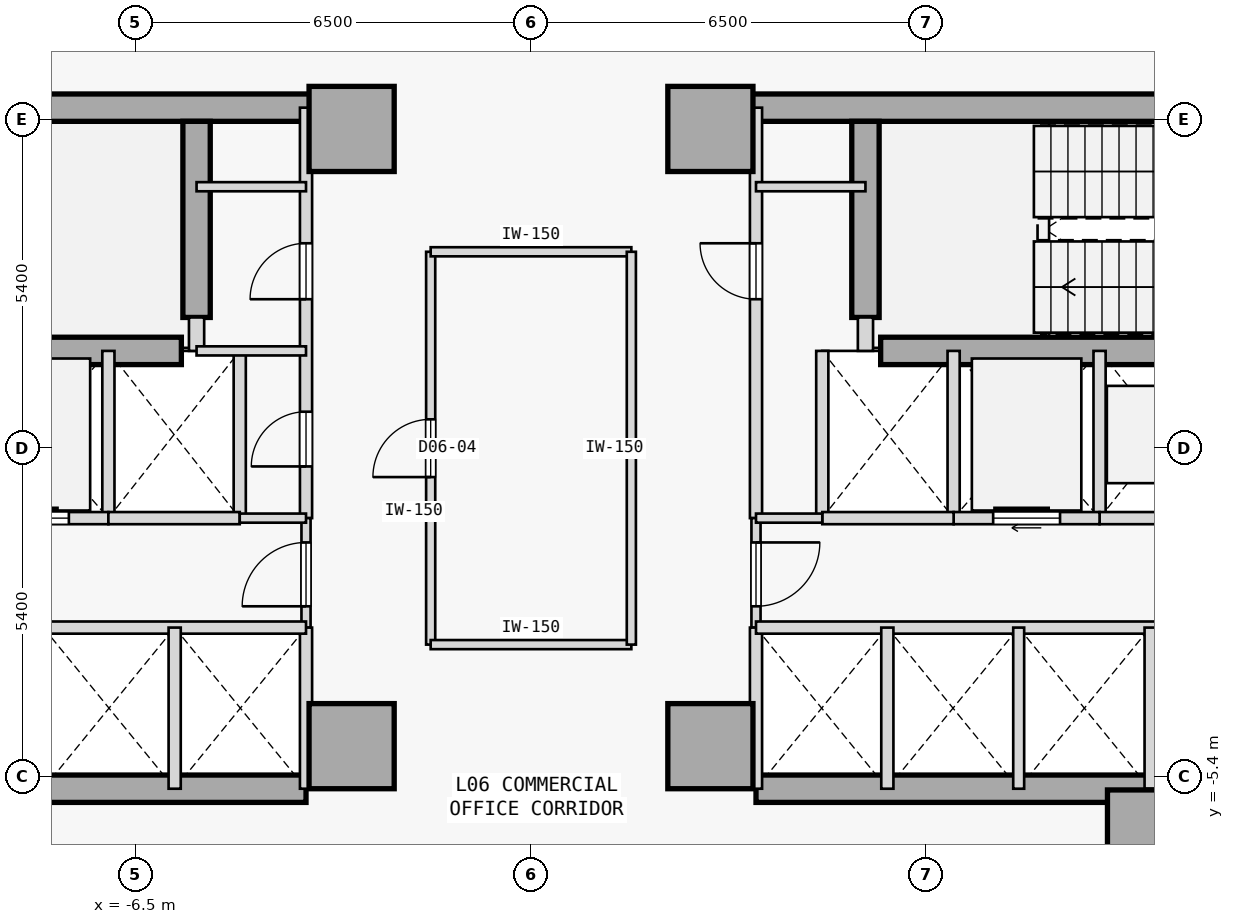
"""IFC4 building model, lengths in metres.
Left out: names, types, materials, properties, quantities, classifications, styles, units other than length and angle.
Written with IfcOpenShell. Run it as: python <this file> out.ifc"""

import sys

from ifc_helpers import new_model, si_unit, direction, frame, frame_2d, origin, origin_2d, place, context, subcontext, project, spatial, rectangle, extrude, element, fill, save


model = new_model("IFC4")
c1 = context("Model", 3, precision=1e-05, world=origin(), true_north=direction((0.0, 1.0)))
c2 = subcontext(c1, "Body", "Model", "MODEL_VIEW")
j1 = project(units=[si_unit("LENGTHUNIT", "METRE"), si_unit("PLANEANGLEUNIT", "RADIAN")], contexts=[c1])
p1 = place(None, origin())
s1 = spatial("IfcSite", under=j1, at=p1, CompositionType="ELEMENT")
p2 = place(p1, origin())
s2 = spatial("IfcBuilding", under=s1, at=p2, CompositionType="ELEMENT")
p3 = place(p2, frame((0.0, 0.0, 29.4)))
s3 = spatial("IfcBuildingStorey", under=s2, at=p3, CompositionType="ELEMENT", Elevation=29.4)
for number, where, z_axis, x_axis in (
    (1, (-2.95, -4.9, 0.0), (0.0, 0.0, 1.0), (1.0, 0.0, 0.0)),
    (2, (-2.95, 5.25, 0.0), (0.0, 0.0, 1.0), (1.0, 0.0, 0.0)),
    (3, (10.18, -6.32, 0.0), (0.0, 0.0, 1.0), (1.0, 0.0, 0.0)),
    (4, (2.95, -4.9, 0.0), (0.0, 0.0, 1.0), (1.0, 0.0, 0.0)),
    (5, (2.95, 5.25, 0.0), (0.0, 0.0, 1.0), (1.0, 0.0, 0.0)),
):
    element("IfcColumn", number, at=place(p3, frame(where, z_axis=z_axis, x_axis=x_axis)), inside=s3, PredefinedType="COLUMN", context=c2, shape_type="SweptSolid", body=[
        extrude(rectangle(XDim=1.4, YDim=1.4, at=origin_2d()), origin(), (0.0, 0.0, 1.0), 3.8),
    ])
p4 = place(p3, frame((-14.56, 5.6, 0.0), z_axis=(0.0, 0.0, 1.0), x_axis=(1.0, 0.0, 0.0)))
e6 = element("IfcWall", 6, at=p4, inside=s3, PredefinedType="SHEAR", context=c2, shape_type="SweptSolid", body=[
    extrude(rectangle(XDim=11.41, YDim=0.45, at=frame_2d((5.705, 0.0))), origin(), (0.0, 0.0, 1.0), 3.575),
])
p5 = place(p3, frame((-14.56, -5.6, 0.0), z_axis=(0.0, 0.0, 1.0), x_axis=(1.0, 0.0, 0.0)))
e7 = element("IfcWall", 7, at=p5, inside=s3, PredefinedType="SHEAR", context=c2, shape_type="SweptSolid", body=[
    extrude(rectangle(XDim=10.86, YDim=0.45, at=frame_2d((5.43, 0.0))), origin(), (0.0, 0.0, 1.0), 3.575),
])
p6 = place(p3, frame((-5.5, 2.15, 0.0), z_axis=(0.0, 0.0, 1.0), x_axis=(0.0, 1.0, 0.0)))
e8 = element("IfcWall", 8, at=p6, inside=s3, PredefinedType="SHEAR", context=c2, shape_type="SweptSolid", body=[
    extrude(rectangle(XDim=3.225, YDim=0.45, at=frame_2d((1.613, 0.0))), origin(), (0.0, 0.0, 1.0), 3.575),
])
p7 = place(p3, frame((-10.9, 1.6, 0.0), z_axis=(0.0, 0.0, 1.0), x_axis=(1.0, 0.0, 0.0)))
e9 = element("IfcWall", 9, at=p7, inside=s3, PredefinedType="SHEAR", context=c2, shape_type="SweptSolid", body=[
    extrude(rectangle(XDim=5.15, YDim=0.45, at=frame_2d((2.575, 0.0))), origin(), (0.0, 0.0, 1.0), 3.575),
])
p8 = place(p3, frame((3.15, 5.6, 0.0), z_axis=(0.0, 0.0, 1.0), x_axis=(1.0, 0.0, 0.0)))
e10 = element("IfcWall", 10, at=p8, inside=s3, PredefinedType="SHEAR", context=c2, shape_type="SweptSolid", body=[
    extrude(rectangle(XDim=11.41, YDim=0.45, at=frame_2d((5.705, 0.0))), origin(), (0.0, 0.0, 1.0), 3.575),
])
p9 = place(p3, frame((3.7, -5.6, 0.0), z_axis=(0.0, 0.0, 1.0), x_axis=(1.0, 0.0, 0.0)))
e11 = element("IfcWall", 11, at=p9, inside=s3, PredefinedType="SHEAR", context=c2, shape_type="SweptSolid", body=[
    extrude(rectangle(XDim=10.86, YDim=0.45, at=frame_2d((5.43, 0.0))), origin(), (0.0, 0.0, 1.0), 3.575),
])
p10 = place(p3, frame((5.5, 2.15, 0.0), z_axis=(0.0, 0.0, 1.0), x_axis=(0.0, 1.0, 0.0)))
e12 = element("IfcWall", 12, at=p10, inside=s3, PredefinedType="SHEAR", context=c2, shape_type="SweptSolid", body=[
    extrude(rectangle(XDim=3.225, YDim=0.45, at=frame_2d((1.613, 0.0))), origin(), (0.0, 0.0, 1.0), 3.575),
])
p11 = place(p3, frame((5.75, 1.6, 0.0), z_axis=(0.0, 0.0, 1.0), x_axis=(1.0, 0.0, 0.0)))
e13 = element("IfcWall", 13, at=p11, inside=s3, PredefinedType="SHEAR", context=c2, shape_type="SweptSolid", body=[
    extrude(rectangle(XDim=5.15, YDim=0.45, at=frame_2d((2.575, 0.0))), origin(), (0.0, 0.0, 1.0), 3.575),
])
p12 = place(p3, frame((-5.5, 1.6, 0.0), z_axis=(0.0, 0.0, 1.0), x_axis=(0.0, 1.0, 0.0)))
e14 = element("IfcWall", 14, at=p12, inside=s3, PredefinedType="STANDARD", context=c2, shape_type="SweptSolid", body=[
    extrude(rectangle(XDim=0.55, YDim=0.25, at=frame_2d((0.275, 0.0))), origin(), (0.0, 0.0, 1.0), 3.575),
])
p13 = place(p3, frame((-3.7, -1.15, 0.0), z_axis=(0.0, 0.0, 1.0), x_axis=(0.0, 1.0, 0.0)))
e15 = element("IfcWall", 15, at=p13, inside=s3, PredefinedType="STANDARD", context=c2, shape_type="SweptSolid", body=[
    extrude(rectangle(XDim=6.75, YDim=0.2, at=frame_2d((3.375, 0.0))), origin(), (0.0, 0.0, 1.0), 3.575),
])
p14 = place(p13, frame((3.6, 0.0, 0.0)))
e16 = element("IfcOpeningElement", 16, at=p14, cuts=e15, PredefinedType="OPENING", context=c2, shape_type="SweptSolid", body=[
    extrude(rectangle(XDim=0.92, YDim=2.15, at=frame_2d((0.46, 1.075))), frame((0.0, 0.11, 0.0), z_axis=(0.0, -1.0, 0.0), x_axis=(1.0, 0.0, 0.0)), (0.0, 0.0, 1.0), 0.22),
])
p15 = place(p13, frame((0.85, 0.0, 0.0)))
e17 = element("IfcOpeningElement", 17, at=p15, cuts=e15, PredefinedType="OPENING", context=c2, shape_type="SweptSolid", body=[
    extrude(rectangle(XDim=0.9, YDim=2.15, at=frame_2d((0.45, 1.075))), frame((0.0, 0.11, 0.0), z_axis=(0.0, -1.0, 0.0), x_axis=(1.0, 0.0, 0.0)), (0.0, 0.0, 1.0), 0.22),
])
p16 = place(p3, frame((-3.7, -2.95, 0.0), z_axis=(0.0, 0.0, 1.0), x_axis=(0.0, 1.0, 0.0)))
e18 = element("IfcWall", 18, at=p16, inside=s3, PredefinedType="PARTITIONING", context=c2, shape_type="SweptSolid", body=[
    extrude(rectangle(XDim=1.8, YDim=0.15, at=frame_2d((0.9, 0.0))), origin(), (0.0, 0.0, 1.0), 3.575),
])
p17 = place(p16, frame((0.35, 0.0, 0.0)))
e19 = element("IfcOpeningElement", 19, at=p17, cuts=e18, PredefinedType="OPENING", context=c2, shape_type="SweptSolid", body=[
    extrude(rectangle(XDim=1.05, YDim=2.18, at=frame_2d((0.525, 1.09))), frame((0.0, 0.085, 0.0), z_axis=(0.0, -1.0, 0.0), x_axis=(1.0, 0.0, 0.0)), (0.0, 0.0, 1.0), 0.17),
])
p18 = place(p3, frame((-3.7, -5.6, 0.0), z_axis=(0.0, 0.0, 1.0), x_axis=(0.0, 1.0, 0.0)))
e20 = element("IfcWall", 20, at=p18, inside=s3, PredefinedType="STANDARD", context=c2, shape_type="SweptSolid", body=[
    extrude(rectangle(XDim=2.65, YDim=0.2, at=frame_2d((1.325, 0.0))), origin(), (0.0, 0.0, 1.0), 3.575),
])
p19 = place(p3, frame((-6.95, -1.15, 0.0), z_axis=(0.0, 0.0, 1.0), x_axis=(0.0, 1.0, 0.0)))
e21 = element("IfcWall", 21, at=p19, inside=s3, PredefinedType="STANDARD", context=c2, shape_type="SweptSolid", body=[
    extrude(rectangle(XDim=2.75, YDim=0.2, at=frame_2d((1.375, 0.0))), origin(), (0.0, 0.0, 1.0), 3.575),
])
p20 = place(p3, frame((-9.35, -1.15, 0.0), z_axis=(0.0, 0.0, 1.0), x_axis=(1.0, 0.0, 0.0)))
e22 = element("IfcWall", 22, at=p20, inside=s3, PredefinedType="STANDARD", context=c2, shape_type="SweptSolid", body=[
    extrude(rectangle(XDim=2.4, YDim=0.2, at=frame_2d((1.2, 0.0))), origin(), (0.0, 0.0, 1.0), 3.575),
])
p21 = place(p20, frame((0.65, 0.0, 0.0)))
e23 = element("IfcOpeningElement", 23, at=p21, cuts=e22, PredefinedType="OPENING", context=c2, shape_type="SweptSolid", body=[
    extrude(rectangle(XDim=1.1, YDim=2.15, at=frame_2d((0.55, 1.075))), frame((0.0, 0.11, 0.0), z_axis=(0.0, -1.0, 0.0), x_axis=(1.0, 0.0, 0.0)), (0.0, 0.0, 1.0), 0.22),
])
p22 = place(p3, frame((-4.79, -1.15, 0.0), z_axis=(0.0, 0.0, 1.0), x_axis=(0.0, 1.0, 0.0)))
e24 = element("IfcWall", 24, at=p22, inside=s3, PredefinedType="STANDARD", context=c2, shape_type="SweptSolid", body=[
    extrude(rectangle(XDim=2.75, YDim=0.2, at=frame_2d((1.375, 0.0))), origin(), (0.0, 0.0, 1.0), 3.575),
])
p23 = place(p3, frame((-6.95, -1.15, 0.0), z_axis=(0.0, 0.0, 1.0), x_axis=(1.0, 0.0, 0.0)))
e25 = element("IfcWall", 25, at=p23, inside=s3, PredefinedType="STANDARD", context=c2, shape_type="SweptSolid", body=[
    extrude(rectangle(XDim=2.16, YDim=0.2, at=frame_2d((1.08, 0.0))), origin(), (0.0, 0.0, 1.0), 3.575),
])
p24 = place(p3, frame((-4.79, -1.15, 0.0), z_axis=(0.0, 0.0, 1.0), x_axis=(1.0, 0.0, 0.0)))
e26 = element("IfcWall", 26, at=p24, inside=s3, PredefinedType="PARTITIONING", context=c2, shape_type="SweptSolid", body=[
    extrude(rectangle(XDim=1.09, YDim=0.15, at=frame_2d((0.545, 0.0))), origin(), (0.0, 0.0, 1.0), 3.575),
])
p25 = place(p3, frame((-14.5, -2.95, 0.0), z_axis=(0.0, 0.0, 1.0), x_axis=(1.0, 0.0, 0.0)))
e27 = element("IfcWall", 27, at=p25, inside=s3, PredefinedType="STANDARD", context=c2, shape_type="SweptSolid", body=[
    extrude(rectangle(XDim=10.8, YDim=0.2, at=frame_2d((5.4, 0.0))), origin(), (0.0, 0.0, 1.0), 3.575),
])
p26 = place(p25, frame((0.53, 0.0, 0.0)))
e28 = element("IfcOpeningElement", 28, at=p26, cuts=e27, PredefinedType="OPENING", context=c2, shape_type="SweptSolid", body=[
    extrude(rectangle(XDim=1.1, YDim=2.15, at=frame_2d((0.55, 1.075))), frame((0.0, 0.11, 0.0), z_axis=(0.0, -1.0, 0.0), x_axis=(1.0, 0.0, 0.0)), (0.0, 0.0, 1.0), 0.22),
])
p27 = place(p25, frame((2.69, 0.0, 0.0)))
e29 = element("IfcOpeningElement", 29, at=p27, cuts=e27, PredefinedType="OPENING", context=c2, shape_type="SweptSolid", body=[
    extrude(rectangle(XDim=1.1, YDim=2.15, at=frame_2d((0.55, 1.075))), frame((0.0, 0.11, 0.0), z_axis=(0.0, -1.0, 0.0), x_axis=(1.0, 0.0, 0.0)), (0.0, 0.0, 1.0), 0.22),
])
p28 = place(p3, frame((-5.86, -5.6, 0.0), z_axis=(0.0, 0.0, 1.0), x_axis=(0.0, 1.0, 0.0)))
e30 = element("IfcWall", 30, at=p28, inside=s3, PredefinedType="STANDARD", context=c2, shape_type="SweptSolid", body=[
    extrude(rectangle(XDim=2.65, YDim=0.2, at=frame_2d((1.325, 0.0))), origin(), (0.0, 0.0, 1.0), 3.575),
])
p29 = place(p3, frame((5.5, 1.6, 0.0), z_axis=(0.0, 0.0, 1.0), x_axis=(0.0, 1.0, 0.0)))
e31 = element("IfcWall", 31, at=p29, inside=s3, PredefinedType="STANDARD", context=c2, shape_type="SweptSolid", body=[
    extrude(rectangle(XDim=0.55, YDim=0.25, at=frame_2d((0.275, 0.0))), origin(), (0.0, 0.0, 1.0), 3.575),
])
p30 = place(p3, frame((3.7, -1.15, 0.0), z_axis=(0.0, 0.0, 1.0), x_axis=(0.0, 1.0, 0.0)))
e32 = element("IfcWall", 32, at=p30, inside=s3, PredefinedType="STANDARD", context=c2, shape_type="SweptSolid", body=[
    extrude(rectangle(XDim=6.75, YDim=0.2, at=frame_2d((3.375, 0.0))), origin(), (0.0, 0.0, 1.0), 3.575),
])
p31 = place(p30, frame((3.6, 0.0, 0.0)))
e33 = element("IfcOpeningElement", 33, at=p31, cuts=e32, PredefinedType="OPENING", context=c2, shape_type="SweptSolid", body=[
    extrude(rectangle(XDim=0.92, YDim=2.15, at=frame_2d((0.46, 1.075))), frame((0.0, 0.11, 0.0), z_axis=(0.0, -1.0, 0.0), x_axis=(1.0, 0.0, 0.0)), (0.0, 0.0, 1.0), 0.22),
])
p32 = place(p3, frame((3.7, -2.95, 0.0), z_axis=(0.0, 0.0, 1.0), x_axis=(0.0, 1.0, 0.0)))
e34 = element("IfcWall", 34, at=p32, inside=s3, PredefinedType="PARTITIONING", context=c2, shape_type="SweptSolid", body=[
    extrude(rectangle(XDim=1.8, YDim=0.15, at=frame_2d((0.9, 0.0))), origin(), (0.0, 0.0, 1.0), 3.575),
])
p33 = place(p32, frame((0.35, 0.0, 0.0)))
e35 = element("IfcOpeningElement", 35, at=p33, cuts=e34, PredefinedType="OPENING", context=c2, shape_type="SweptSolid", body=[
    extrude(rectangle(XDim=1.05, YDim=2.18, at=frame_2d((0.525, 1.09))), frame((0.0, 0.085, 0.0), z_axis=(0.0, -1.0, 0.0), x_axis=(1.0, 0.0, 0.0)), (0.0, 0.0, 1.0), 0.17),
])
p34 = place(p3, frame((3.7, -5.6, 0.0), z_axis=(0.0, 0.0, 1.0), x_axis=(0.0, 1.0, 0.0)))
e36 = element("IfcWall", 36, at=p34, inside=s3, PredefinedType="STANDARD", context=c2, shape_type="SweptSolid", body=[
    extrude(rectangle(XDim=2.65, YDim=0.2, at=frame_2d((1.325, 0.0))), origin(), (0.0, 0.0, 1.0), 3.575),
])
p35 = place(p3, frame((9.35, -1.15, 0.0), z_axis=(0.0, 0.0, 1.0), x_axis=(0.0, 1.0, 0.0)))
e37 = element("IfcWall", 37, at=p35, inside=s3, PredefinedType="STANDARD", context=c2, shape_type="SweptSolid", body=[
    extrude(rectangle(XDim=2.75, YDim=0.2, at=frame_2d((1.375, 0.0))), origin(), (0.0, 0.0, 1.0), 3.575),
])
p36 = place(p3, frame((9.35, -1.15, 0.0), z_axis=(0.0, 0.0, 1.0), x_axis=(1.0, 0.0, 0.0)))
e38 = element("IfcWall", 38, at=p36, inside=s3, PredefinedType="STANDARD", context=c2, shape_type="SweptSolid", body=[
    extrude(rectangle(XDim=2.2, YDim=0.2, at=frame_2d((1.1, 0.0))), origin(), (0.0, 0.0, 1.0), 3.575),
])
p37 = place(p3, frame((6.95, -1.15, 0.0), z_axis=(0.0, 0.0, 1.0), x_axis=(0.0, 1.0, 0.0)))
e39 = element("IfcWall", 39, at=p37, inside=s3, PredefinedType="STANDARD", context=c2, shape_type="SweptSolid", body=[
    extrude(rectangle(XDim=2.75, YDim=0.2, at=frame_2d((1.375, 0.0))), origin(), (0.0, 0.0, 1.0), 3.575),
])
p38 = place(p3, frame((6.95, -1.15, 0.0), z_axis=(0.0, 0.0, 1.0), x_axis=(1.0, 0.0, 0.0)))
e40 = element("IfcWall", 40, at=p38, inside=s3, PredefinedType="STANDARD", context=c2, shape_type="SweptSolid", body=[
    extrude(rectangle(XDim=2.4, YDim=0.2, at=frame_2d((1.2, 0.0))), origin(), (0.0, 0.0, 1.0), 3.575),
])
p39 = place(p38, frame((0.65, 0.0, 0.0)))
e41 = element("IfcOpeningElement", 41, at=p39, cuts=e40, PredefinedType="OPENING", context=c2, shape_type="SweptSolid", body=[
    extrude(rectangle(XDim=1.1, YDim=2.15, at=frame_2d((0.55, 1.075))), frame((0.0, 0.11, 0.0), z_axis=(0.0, -1.0, 0.0), x_axis=(1.0, 0.0, 0.0)), (0.0, 0.0, 1.0), 0.22),
])
p40 = place(p3, frame((4.79, -1.15, 0.0), z_axis=(0.0, 0.0, 1.0), x_axis=(0.0, 1.0, 0.0)))
e42 = element("IfcWall", 42, at=p40, inside=s3, PredefinedType="STANDARD", context=c2, shape_type="SweptSolid", body=[
    extrude(rectangle(XDim=2.75, YDim=0.2, at=frame_2d((1.375, 0.0))), origin(), (0.0, 0.0, 1.0), 3.575),
])
p41 = place(p3, frame((4.79, -1.15, 0.0), z_axis=(0.0, 0.0, 1.0), x_axis=(1.0, 0.0, 0.0)))
e43 = element("IfcWall", 43, at=p41, inside=s3, PredefinedType="STANDARD", context=c2, shape_type="SweptSolid", body=[
    extrude(rectangle(XDim=2.16, YDim=0.2, at=frame_2d((1.08, 0.0))), origin(), (0.0, 0.0, 1.0), 3.575),
])
p42 = place(p3, frame((3.7, -1.15, 0.0), z_axis=(0.0, 0.0, 1.0), x_axis=(1.0, 0.0, 0.0)))
e44 = element("IfcWall", 44, at=p42, inside=s3, PredefinedType="PARTITIONING", context=c2, shape_type="SweptSolid", body=[
    extrude(rectangle(XDim=1.09, YDim=0.15, at=frame_2d((0.545, 0.0))), origin(), (0.0, 0.0, 1.0), 3.575),
])
p43 = place(p3, frame((3.7, -2.95, 0.0), z_axis=(0.0, 0.0, 1.0), x_axis=(1.0, 0.0, 0.0)))
e45 = element("IfcWall", 45, at=p43, inside=s3, PredefinedType="STANDARD", context=c2, shape_type="SweptSolid", body=[
    extrude(rectangle(XDim=10.8, YDim=0.2, at=frame_2d((5.4, 0.0))), origin(), (0.0, 0.0, 1.0), 3.575),
])
p44 = place(p43, frame((7.01, 0.0, 0.0)))
e46 = element("IfcOpeningElement", 46, at=p44, cuts=e45, PredefinedType="OPENING", context=c2, shape_type="SweptSolid", body=[
    extrude(rectangle(XDim=1.1, YDim=2.15, at=frame_2d((0.55, 1.075))), frame((0.0, 0.11, 0.0), z_axis=(0.0, -1.0, 0.0), x_axis=(1.0, 0.0, 0.0)), (0.0, 0.0, 1.0), 0.22),
])
p45 = place(p43, frame((9.17, 0.0, 0.0)))
e47 = element("IfcOpeningElement", 47, at=p45, cuts=e45, PredefinedType="OPENING", context=c2, shape_type="SweptSolid", body=[
    extrude(rectangle(XDim=1.1, YDim=2.15, at=frame_2d((0.55, 1.075))), frame((0.0, 0.11, 0.0), z_axis=(0.0, -1.0, 0.0), x_axis=(1.0, 0.0, 0.0)), (0.0, 0.0, 1.0), 0.22),
])
p46 = place(p3, frame((5.86, -5.6, 0.0), z_axis=(0.0, 0.0, 1.0), x_axis=(0.0, 1.0, 0.0)))
e48 = element("IfcWall", 48, at=p46, inside=s3, PredefinedType="STANDARD", context=c2, shape_type="SweptSolid", body=[
    extrude(rectangle(XDim=2.65, YDim=0.2, at=frame_2d((1.325, 0.0))), origin(), (0.0, 0.0, 1.0), 3.575),
])
for number, where, z_axis, x_axis in (
    (49, (10.18, -5.6, 0.0), (0.0, 0.0, 1.0), (0.0, 1.0, 0.0)),
    (50, (8.02, -5.6, 0.0), (0.0, 0.0, 1.0), (0.0, 1.0, 0.0)),
):
    element("IfcWall", number, at=place(p3, frame(where, z_axis=z_axis, x_axis=x_axis)), inside=s3, PredefinedType="STANDARD", context=c2, shape_type="SweptSolid", body=[
        extrude(rectangle(XDim=2.65, YDim=0.18, at=frame_2d((1.325, 0.0))), origin(), (0.0, 0.0, 1.0), 3.575),
    ])
for number, where, z_axis, x_axis in (
    (51, (-5.5, 4.3, 0.0), (0.0, 0.0, 1.0), (1.0, 0.0, 0.0)),
    (52, (-5.5, 1.6, 0.0), (0.0, 0.0, 1.0), (1.0, 0.0, 0.0)),
    (53, (3.7, 4.3, 0.0), (0.0, 0.0, 1.0), (1.0, 0.0, 0.0)),
):
    element("IfcWall", number, at=place(p3, frame(where, z_axis=z_axis, x_axis=x_axis)), inside=s3, PredefinedType="PARTITIONING", context=c2, shape_type="SweptSolid", body=[
        extrude(rectangle(XDim=1.8, YDim=0.15, at=frame_2d((0.9, 0.0))), origin(), (0.0, 0.0, 1.0), 3.575),
    ])
p47 = place(p3, frame((-1.65, -3.23, 0.0), z_axis=(0.0, 0.0, 1.0), x_axis=(0.0, 1.0, 0.0)))
e54 = element("IfcWall", 54, at=p47, inside=s3, PredefinedType="PARTITIONING", context=c2, shape_type="SweptSolid", body=[
    extrude(rectangle(XDim=6.46, YDim=0.15, at=frame_2d((3.23, 0.0))), origin(), (0.0, 0.0, 1.0), 3.575),
])
p48 = place(p47, frame((2.755, 0.0, 0.0)))
e55 = element("IfcOpeningElement", 55, at=p48, cuts=e54, PredefinedType="OPENING", context=c2, shape_type="SweptSolid", body=[
    extrude(rectangle(XDim=0.95, YDim=2.15, at=frame_2d((0.475, 1.075))), frame((0.0, 0.085, 0.0), z_axis=(0.0, -1.0, 0.0), x_axis=(1.0, 0.0, 0.0)), (0.0, 0.0, 1.0), 0.17),
])
for number, where, z_axis, x_axis in (
    (56, (-1.65, -3.23, 0.0), (0.0, 0.0, 1.0), (1.0, 0.0, 0.0)),
    (57, (-1.65, 3.23, 0.0), (0.0, 0.0, 1.0), (1.0, 0.0, 0.0)),
):
    element("IfcWall", number, at=place(p3, frame(where, z_axis=z_axis, x_axis=x_axis)), inside=s3, PredefinedType="PARTITIONING", context=c2, shape_type="SweptSolid", body=[
        extrude(rectangle(XDim=3.3, YDim=0.15, at=frame_2d((1.65, 0.0))), origin(), (0.0, 0.0, 1.0), 3.575),
    ])
p49 = place(p3, frame((1.65, -3.23, 0.0), z_axis=(0.0, 0.0, 1.0), x_axis=(0.0, 1.0, 0.0)))
e58 = element("IfcWall", 58, at=p49, inside=s3, PredefinedType="PARTITIONING", context=c2, shape_type="SweptSolid", body=[
    extrude(rectangle(XDim=6.46, YDim=0.15, at=frame_2d((3.23, 0.0))), origin(), (0.0, 0.0, 1.0), 3.575),
])
p50 = place(p17, origin())
e59 = element("IfcDoor", 59, at=p50, inside=s3, OperationType="SINGLE_SWING_LEFT", PredefinedType="DOOR", context=c2, shape_type="SweptSolid", body=[
    extrude(rectangle(XDim=1.05, YDim=2.18, at=frame_2d((0.525, 1.09))), frame((0.0, 0.025, 0.0), z_axis=(0.0, -1.0, 0.0), x_axis=(1.0, 0.0, 0.0)), (0.0, 0.0, 1.0), 0.05),
])
fill(e19, e59)
p51 = place(p21, origin())
e60 = element("IfcDoor", 60, at=p51, inside=s3, OperationType="SLIDING_TO_RIGHT", PredefinedType="DOOR", context=c2, shape_type="SweptSolid", body=[
    extrude(rectangle(XDim=1.1, YDim=2.15, at=frame_2d((0.55, 1.075))), frame((0.0, 0.025, 0.0), z_axis=(0.0, -1.0, 0.0), x_axis=(1.0, 0.0, 0.0)), (0.0, 0.0, 1.0), 0.05),
])
fill(e23, e60)
p52 = place(p33, frame((1.05, 0.0, 0.0), z_axis=(0.0, 0.0, 1.0), x_axis=(-1.0, 0.0, 0.0)))
e61 = element("IfcDoor", 61, at=p52, inside=s3, OperationType="SINGLE_SWING_RIGHT", PredefinedType="DOOR", context=c2, shape_type="SweptSolid", body=[
    extrude(rectangle(XDim=1.05, YDim=2.18, at=frame_2d((0.525, 1.09))), frame((0.0, 0.025, 0.0), z_axis=(0.0, -1.0, 0.0), x_axis=(1.0, 0.0, 0.0)), (0.0, 0.0, 1.0), 0.05),
])
fill(e35, e61)
p53 = place(p39, origin())
e62 = element("IfcDoor", 62, at=p53, inside=s3, OperationType="SLIDING_TO_RIGHT", PredefinedType="DOOR", context=c2, shape_type="SweptSolid", body=[
    extrude(rectangle(XDim=1.1, YDim=2.15, at=frame_2d((0.55, 1.075))), frame((0.0, 0.025, 0.0), z_axis=(0.0, -1.0, 0.0), x_axis=(1.0, 0.0, 0.0)), (0.0, 0.0, 1.0), 0.05),
])
fill(e41, e62)
p54 = place(p14, origin())
e63 = element("IfcDoor", 63, at=p54, inside=s3, OperationType="SINGLE_SWING_LEFT", PredefinedType="DOOR", context=c2, shape_type="SweptSolid", body=[
    extrude(rectangle(XDim=0.92, YDim=2.15, at=frame_2d((0.46, 1.075))), frame((0.0, 0.025, 0.0), z_axis=(0.0, -1.0, 0.0), x_axis=(1.0, 0.0, 0.0)), (0.0, 0.0, 1.0), 0.05),
])
fill(e16, e63)
p55 = place(p15, origin())
e64 = element("IfcDoor", 64, at=p55, inside=s3, OperationType="SINGLE_SWING_LEFT", PredefinedType="DOOR", context=c2, shape_type="SweptSolid", body=[
    extrude(rectangle(XDim=0.9, YDim=2.15, at=frame_2d((0.45, 1.075))), frame((0.0, 0.025, 0.0), z_axis=(0.0, -1.0, 0.0), x_axis=(1.0, 0.0, 0.0)), (0.0, 0.0, 1.0), 0.05),
])
fill(e17, e64)
p56 = place(p31, origin())
e65 = element("IfcDoor", 65, at=p56, inside=s3, OperationType="SINGLE_SWING_RIGHT", PredefinedType="DOOR", context=c2, shape_type="SweptSolid", body=[
    extrude(rectangle(XDim=0.92, YDim=2.15, at=frame_2d((0.46, 1.075))), frame((0.0, 0.025, 0.0), z_axis=(0.0, -1.0, 0.0), x_axis=(1.0, 0.0, 0.0)), (0.0, 0.0, 1.0), 0.05),
])
fill(e33, e65)
p57 = place(p48, origin())
e66 = element("IfcDoor", 66, at=p57, inside=s3, OperationType="SINGLE_SWING_LEFT", PredefinedType="DOOR", context=c2, shape_type="SweptSolid", body=[
    extrude(rectangle(XDim=0.95, YDim=2.15, at=frame_2d((0.475, 1.075))), frame((0.0, 0.025, 0.0), z_axis=(0.0, -1.0, 0.0), x_axis=(1.0, 0.0, 0.0)), (0.0, 0.0, 1.0), 0.05),
])
fill(e55, e66)
save(model, sys.argv[1])
